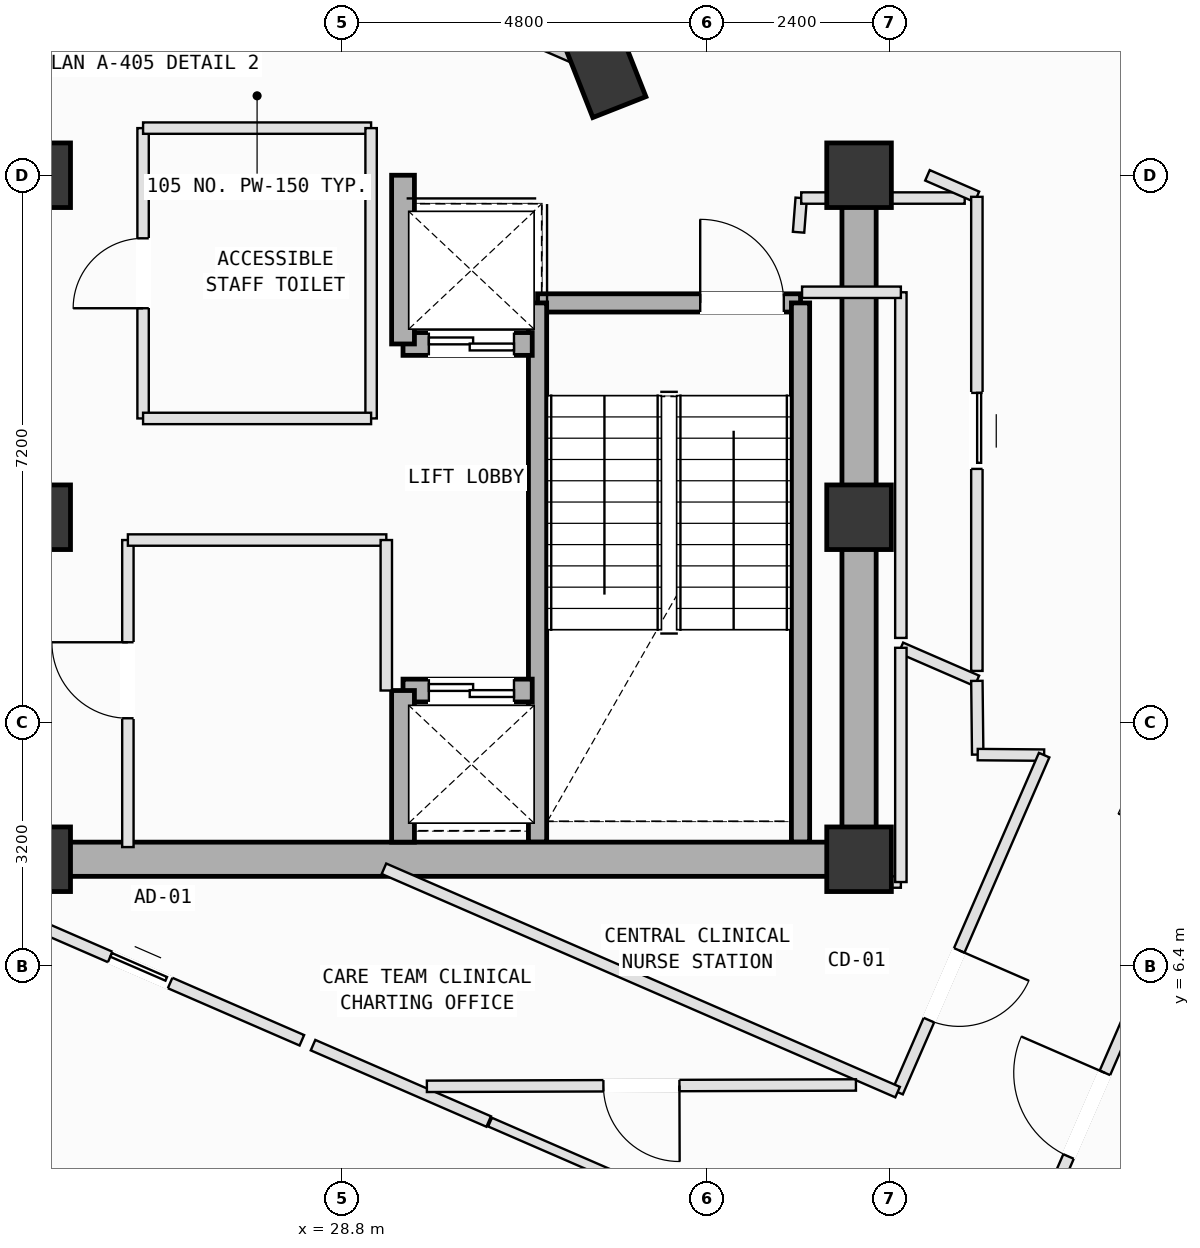
"""IFC4 building model, lengths in metres.
Left out: names, types, materials, properties, quantities, classifications, styles, units other than length and angle.
Written with IfcOpenShell. Run it as: python <this file> out.ifc"""

import sys

from ifc_helpers import new_model, si_unit, direction, frame, frame_2d, origin, origin_2d, place, context, subcontext, project, spatial, rectangle, extrude, element, fill, save


model = new_model("IFC4")
c1 = context("Model", 3, precision=1e-05, world=origin(), true_north=direction((0.0, 1.0)))
c2 = subcontext(c1, "Body", "Model", "MODEL_VIEW")
j1 = project(units=[si_unit("LENGTHUNIT", "METRE"), si_unit("PLANEANGLEUNIT", "RADIAN")], contexts=[c1])
p1 = place(None, origin())
s1 = spatial("IfcSite", under=j1, at=p1, CompositionType="ELEMENT")
p2 = place(p1, origin())
s2 = spatial("IfcBuilding", under=s1, at=p2, CompositionType="ELEMENT")
p3 = place(p2, frame((0.0, 0.0, 324.6)))
s3 = spatial("IfcBuildingStorey", under=s2, at=p3, CompositionType="ELEMENT", Elevation=324.6)
for number, where, z_axis, x_axis in (
    (1, (24.8, 7.8, 0.0), (0.0, 0.0, 1.0), (1.0, 0.0, 0.0)),
    (2, (24.8, 12.3, 0.0), (0.0, 0.0, 1.0), (1.0, 0.0, 0.0)),
    (3, (24.8, 16.8, 0.0), (0.0, 0.0, 1.0), (1.0, 0.0, 0.0)),
    (4, (35.6, 7.8, 0.0), (0.0, 0.0, 1.0), (1.0, 0.0, 0.0)),
    (5, (35.6, 12.3, 0.0), (0.0, 0.0, 1.0), (1.0, 0.0, 0.0)),
    (6, (35.6, 16.8, 0.0), (0.0, 0.0, 1.0), (1.0, 0.0, 0.0)),
):
    element("IfcColumn", number, at=place(p3, frame(where, z_axis=z_axis, x_axis=x_axis)), inside=s3, PredefinedType="COLUMN", context=c2, shape_type="SweptSolid", body=[
        extrude(rectangle(XDim=0.85, YDim=0.85, at=origin_2d()), origin(), (0.0, 0.0, 1.0), 4.0),
    ])
p4 = place(p3, frame((32.226, 18.255, 0.002), z_axis=(0.0, 0.0, 1.0), x_axis=(-0.366501226724, 0.930417567982, 0.0)))
e7 = element("IfcColumn", 7, at=p4, inside=s3, PredefinedType="COLUMN", context=c2, shape_type="SweptSolid", body=[
    extrude(rectangle(XDim=1.2, YDim=0.75, at=origin_2d()), origin(), (0.0, 0.0, 1.0), 3.996),
])
p5 = place(p3, frame((25.484, 21.187, 0.0), z_axis=(0.0, 0.0, 1.0), x_axis=(0.917060568388, -0.398747932794, 0.0)))
e8 = element("IfcWall", 8, at=p5, inside=s3, PredefinedType="SOLIDWALL", context=c2, shape_type="SweptSolid", body=[
    extrude(rectangle(XDim=6.955, YDim=0.28, at=frame_2d((3.478, 0.0))), origin(), (0.0, 0.0, 1.0), 2.765),
])
p6 = place(p3, frame((31.37, 15.12, 0.0), z_axis=(0.0, 0.0, 1.0), x_axis=(1.0, 0.0, 0.0)))
e9 = element("IfcWall", 9, at=p6, inside=s3, PredefinedType="SOLIDWALL", context=c2, shape_type="SweptSolid", body=[
    extrude(rectangle(XDim=3.46, YDim=0.24, at=frame_2d((1.73, 0.0))), origin(), (0.0, 0.0, 1.0), 3.78),
])
p7 = place(p6, frame((2.14, 0.0, 0.0)))
e10 = element("IfcOpeningElement", 10, at=p7, cuts=e9, PredefinedType="OPENING", context=c2, shape_type="SweptSolid", body=[
    extrude(rectangle(XDim=1.1, YDim=2.15, at=frame_2d((0.55, 1.075))), frame((0.0, 0.13, 0.0), z_axis=(0.0, -1.0, 0.0), x_axis=(1.0, 0.0, 0.0)), (0.0, 0.0, 1.0), 0.26),
])
for number, where, z_axis, x_axis in (
    (11, (34.83, 15.12, 0.0), (0.0, 0.0, 1.0), (0.0, -1.0, 0.0)),
    (12, (31.37, 8.025, 0.0), (0.0, 0.0, 1.0), (0.0, 1.0, 0.0)),
):
    element("IfcWall", number, at=place(p3, frame(where, z_axis=z_axis, x_axis=x_axis)), inside=s3, PredefinedType="SOLIDWALL", context=c2, shape_type="SweptSolid", body=[
        extrude(rectangle(XDim=7.095, YDim=0.24, at=frame_2d((3.548, 0.0))), origin(), (0.0, 0.0, 1.0), 3.78),
    ])
p8 = place(p3, frame((24.8, 7.8, 0.0), z_axis=(0.0, 0.0, 1.0), x_axis=(1.0, 0.0, 0.0)))
e13 = element("IfcWall", 13, at=p8, inside=s3, PredefinedType="SHEAR", context=c2, shape_type="SweptSolid", body=[
    extrude(rectangle(XDim=10.8, YDim=0.45, at=frame_2d((5.4, 0.0))), origin(), (0.0, 0.0, 1.0), 3.78),
])
p9 = place(p3, frame((35.6, 7.8, 0.0), z_axis=(0.0, 0.0, 1.0), x_axis=(0.0, 1.0, 0.0)))
e14 = element("IfcWall", 14, at=p9, inside=s3, PredefinedType="SHEAR", context=c2, shape_type="SweptSolid", body=[
    extrude(rectangle(XDim=9.0, YDim=0.45, at=frame_2d((4.5, 0.0))), origin(), (0.0, 0.0, 1.0), 3.78),
])
p10 = place(p3, frame((29.6, 10.02, 0.0), z_axis=(0.0, 0.0, 1.0), x_axis=(1.0, 0.0, 0.0)))
e15 = element("IfcWall", 15, at=p10, inside=s3, PredefinedType="SOLIDWALL", context=c2, shape_type="SweptSolid", body=[
    extrude(rectangle(XDim=1.7, YDim=0.3, at=frame_2d((0.85, 0.0))), origin(), (0.0, 0.0, 1.0), 3.78),
])
p11 = place(p10, frame((0.34, 0.0, 0.0)))
e16 = element("IfcOpeningElement", 16, at=p11, cuts=e15, PredefinedType="OPENING", context=c2, shape_type="SweptSolid", body=[
    extrude(rectangle(XDim=1.12, YDim=2.15, at=frame_2d((0.56, 1.075))), frame((0.0, 0.16, 0.0), z_axis=(0.0, -1.0, 0.0), x_axis=(1.0, 0.0, 0.0)), (0.0, 0.0, 1.0), 0.32),
])
p12 = place(p3, frame((29.6, 8.025, 0.0), z_axis=(0.0, 0.0, 1.0), x_axis=(0.0, 1.0, 0.0)))
e17 = element("IfcWall", 17, at=p12, inside=s3, PredefinedType="SOLIDWALL", context=c2, shape_type="SweptSolid", body=[
    extrude(rectangle(XDim=1.995, YDim=0.3, at=frame_2d((0.998, 0.0))), origin(), (0.0, 0.0, 1.0), 3.78),
])
p13 = place(p3, frame((29.6, 14.58, 0.0), z_axis=(0.0, 0.0, 1.0), x_axis=(1.0, 0.0, 0.0)))
e18 = element("IfcWall", 18, at=p13, inside=s3, PredefinedType="SOLIDWALL", context=c2, shape_type="SweptSolid", body=[
    extrude(rectangle(XDim=1.7, YDim=0.3, at=frame_2d((0.85, 0.0))), origin(), (0.0, 0.0, 1.0), 3.78),
])
p14 = place(p13, frame((0.34, 0.0, 0.0)))
e19 = element("IfcOpeningElement", 19, at=p14, cuts=e18, PredefinedType="OPENING", context=c2, shape_type="SweptSolid", body=[
    extrude(rectangle(XDim=1.12, YDim=2.15, at=frame_2d((0.56, 1.075))), frame((0.0, 0.16, 0.0), z_axis=(0.0, -1.0, 0.0), x_axis=(1.0, 0.0, 0.0)), (0.0, 0.0, 1.0), 0.32),
])
p15 = place(p3, frame((29.6, 14.58, 0.0), z_axis=(0.0, 0.0, 1.0), x_axis=(0.0, 1.0, 0.0)))
e20 = element("IfcWall", 20, at=p15, inside=s3, PredefinedType="SOLIDWALL", context=c2, shape_type="SweptSolid", body=[
    extrude(rectangle(XDim=2.22, YDim=0.3, at=frame_2d((1.11, 0.0))), origin(), (0.0, 0.0, 1.0), 3.78),
])
p16 = place(p3, frame((25.98, 7.96, 0.0), z_axis=(0.0, 0.0, 1.0), x_axis=(0.0, 1.0, 0.0)))
e21 = element("IfcWall", 21, at=p16, inside=s3, PredefinedType="PARTITIONING", context=c2, shape_type="SweptSolid", body=[
    extrude(rectangle(XDim=4.04, YDim=0.15, at=frame_2d((2.02, 0.0))), origin(), (0.0, 0.0, 1.0), 3.78),
])
p17 = place(p16, frame((1.695, 0.0, 0.0)))
e22 = element("IfcOpeningElement", 22, at=p17, cuts=e21, PredefinedType="OPENING", context=c2, shape_type="SweptSolid", body=[
    extrude(rectangle(XDim=1.0, YDim=2.12, at=frame_2d((0.5, 1.06))), frame((0.0, 0.085, 0.0), z_axis=(0.0, -1.0, 0.0), x_axis=(1.0, 0.0, 0.0)), (0.0, 0.0, 1.0), 0.17),
])
p18 = place(p3, frame((25.98, 12.0, 0.0), z_axis=(0.0, 0.0, 1.0), x_axis=(1.0, 0.0, 0.0)))
e23 = element("IfcWall", 23, at=p18, inside=s3, PredefinedType="PARTITIONING", context=c2, shape_type="SweptSolid", body=[
    extrude(rectangle(XDim=3.4, YDim=0.15, at=frame_2d((1.7, 0.0))), origin(), (0.0, 0.0, 1.0), 3.78),
])
p19 = place(p3, frame((29.38, 12.0, 0.0), z_axis=(0.0, 0.0, 1.0), x_axis=(0.0, -1.0, 0.0)))
e24 = element("IfcWall", 24, at=p19, inside=s3, PredefinedType="PARTITIONING", context=c2, shape_type="SweptSolid", body=[
    extrude(rectangle(XDim=1.98, YDim=0.15, at=frame_2d((0.99, 0.0))), origin(), (0.0, 0.0, 1.0), 3.78),
])
p20 = place(p3, frame((26.18, 13.6, 0.0), z_axis=(0.0, 0.0, 1.0), x_axis=(0.0, 1.0, 0.0)))
e25 = element("IfcWall", 25, at=p20, inside=s3, PredefinedType="PARTITIONING", context=c2, shape_type="SweptSolid", body=[
    extrude(rectangle(XDim=3.82, YDim=0.15, at=frame_2d((1.91, 0.0))), origin(), (0.0, 0.0, 1.0), 3.78),
])
p21 = place(p20, frame((1.45, 0.0, 0.0)))
e26 = element("IfcOpeningElement", 26, at=p21, cuts=e25, PredefinedType="OPENING", context=c2, shape_type="SweptSolid", body=[
    extrude(rectangle(XDim=0.92, YDim=2.1, at=frame_2d((0.46, 1.05))), frame((0.0, 0.085, 0.0), z_axis=(0.0, -1.0, 0.0), x_axis=(1.0, 0.0, 0.0)), (0.0, 0.0, 1.0), 0.17),
])
p22 = place(p3, frame((26.18, 17.42, 0.0), z_axis=(0.0, 0.0, 1.0), x_axis=(1.0, 0.0, 0.0)))
e27 = element("IfcWall", 27, at=p22, inside=s3, PredefinedType="PARTITIONING", context=c2, shape_type="SweptSolid", body=[
    extrude(rectangle(XDim=3.0, YDim=0.15, at=frame_2d((1.5, 0.0))), origin(), (0.0, 0.0, 1.0), 3.78),
])
p23 = place(p3, frame((29.18, 17.42, 0.0), z_axis=(0.0, 0.0, 1.0), x_axis=(0.0, -1.0, 0.0)))
e28 = element("IfcWall", 28, at=p23, inside=s3, PredefinedType="PARTITIONING", context=c2, shape_type="SweptSolid", body=[
    extrude(rectangle(XDim=3.82, YDim=0.15, at=frame_2d((1.91, 0.0))), origin(), (0.0, 0.0, 1.0), 3.78),
])
p24 = place(p3, frame((29.18, 13.6, 0.0), z_axis=(0.0, 0.0, 1.0), x_axis=(-1.0, 0.0, 0.0)))
e29 = element("IfcWall", 29, at=p24, inside=s3, PredefinedType="PARTITIONING", context=c2, shape_type="SweptSolid", body=[
    extrude(rectangle(XDim=3.0, YDim=0.15, at=frame_2d((1.5, 0.0))), origin(), (0.0, 0.0, 1.0), 3.78),
])
p25 = place(p3, frame((37.75, 2.495, 0.0), z_axis=(0.0, 0.0, 1.0), x_axis=(0.398827178626, 0.917026107365, 0.0)))
e30 = element("IfcWall", 30, at=p25, inside=s3, PredefinedType="PARTITIONING", context=c2, shape_type="SweptSolid", body=[
    extrude(rectangle(XDim=4.24, YDim=0.15, at=frame_2d((2.12, 0.0))), origin(), (0.0, 0.0, 1.0), 3.78),
])
p26 = place(p25, frame((1.52, 0.0, 0.0)))
e31 = element("IfcOpeningElement", 31, at=p26, cuts=e30, PredefinedType="OPENING", context=c2, shape_type="SweptSolid", body=[
    extrude(rectangle(XDim=1.2, YDim=2.15, at=frame_2d((0.6, 1.075))), frame((0.0, 0.085, 0.0), z_axis=(0.0, -1.0, 0.0), x_axis=(1.0, 0.0, 0.0)), (0.0, 0.0, 1.0), 0.17),
])
p27 = place(p3, frame((28.416, 5.354, 0.0), z_axis=(0.0, 0.0, 1.0), x_axis=(0.917057734147, -0.398754451062, 0.0)))
e32 = element("IfcWall", 32, at=p27, inside=s3, PredefinedType="PARTITIONING", context=c2, shape_type="SweptSolid", body=[
    extrude(rectangle(XDim=2.52, YDim=0.15, at=frame_2d((1.26, 0.0))), origin(), (0.0, 0.0, 1.0), 3.78),
])
p28 = place(p3, frame((30.745, 4.341, 0.0), z_axis=(0.0, 0.0, 1.0), x_axis=(0.917094083809, -0.398670843481, 0.0)))
e33 = element("IfcWall", 33, at=p28, inside=s3, PredefinedType="PARTITIONING", context=c2, shape_type="SweptSolid", body=[
    extrude(rectangle(XDim=2.1, YDim=0.125, at=frame_2d((1.05, 0.0))), origin(), (0.0, 0.0, 1.0), 3.78),
])
p29 = place(p3, frame((24.014, 7.268, 0.0), z_axis=(0.0, 0.0, 1.0), x_axis=(0.91706671013, -0.398733807411, 0.0)))
e34 = element("IfcWall", 34, at=p29, inside=s3, PredefinedType="PARTITIONING", context=c2, shape_type="SweptSolid", body=[
    extrude(rectangle(XDim=4.64, YDim=0.15, at=frame_2d((2.32, 0.0))), origin(), (0.0, 0.0, 1.0), 3.78),
])
p30 = place(p29, frame((1.89, 0.0, 0.0)))
e35 = element("IfcOpeningElement", 35, at=p30, cuts=e34, PredefinedType="OPENING", context=c2, shape_type="SweptSolid", body=[
    extrude(rectangle(XDim=0.86, YDim=2.06, at=frame_2d((0.43, 1.03))), frame((0.0, 0.085, 0.0), z_axis=(0.0, -1.0, 0.0), x_axis=(1.0, 0.0, 0.0)), (0.0, 0.0, 1.0), 0.17),
])
p31 = place(p3, frame((36.15, 10.582, 0.0), z_axis=(0.0, 0.0, 1.0), x_axis=(0.916977493273, -0.398938938724, 0.0)))
e36 = element("IfcWall", 36, at=p31, inside=s3, PredefinedType="PARTITIONING", context=c2, shape_type="SweptSolid", body=[
    extrude(rectangle(XDim=1.091, YDim=0.15, at=frame_2d((0.545, 0.0))), origin(), (0.0, 0.0, 1.0), 3.78),
])
p32 = place(p3, frame((37.15, 10.147, 0.0), z_axis=(0.0, 0.0, 1.0), x_axis=(0.011325727104, -0.999935861896, 0.0)))
e37 = element("IfcWall", 37, at=p32, inside=s3, PredefinedType="PARTITIONING", context=c2, shape_type="SweptSolid", body=[
    extrude(rectangle(XDim=0.97, YDim=0.15, at=frame_2d((0.485, 0.0))), origin(), (0.0, 0.0, 1.0), 3.78),
])
p33 = place(p3, frame((37.161, 9.177, 0.0), z_axis=(0.0, 0.0, 1.0), x_axis=(0.999967192089, -0.008100292897, 0.0)))
e38 = element("IfcWall", 38, at=p33, inside=s3, PredefinedType="PARTITIONING", context=c2, shape_type="SweptSolid", body=[
    extrude(rectangle(XDim=0.874, YDim=0.15, at=frame_2d((0.437, 0.0))), origin(), (0.0, 0.0, 1.0), 3.78),
])
p34 = place(p3, frame((38.035, 9.17, 0.0), z_axis=(0.0, 0.0, 1.0), x_axis=(-0.398764886009, -0.917053196759, 0.0)))
e39 = element("IfcWall", 39, at=p34, inside=s3, PredefinedType="PARTITIONING", context=c2, shape_type="SweptSolid", body=[
    extrude(rectangle(XDim=4.835, YDim=0.15, at=frame_2d((2.417, 0.0))), origin(), (0.0, 0.0, 1.0), 3.78),
])
p35 = place(p34, frame((2.802, 0.0, 0.0)))
e40 = element("IfcOpeningElement", 40, at=p35, cuts=e39, PredefinedType="OPENING", context=c2, shape_type="SweptSolid", body=[
    extrude(rectangle(XDim=1.0, YDim=2.12, at=frame_2d((0.5, 1.06))), frame((0.0, 0.085, 0.0), z_axis=(0.0, -1.0, 0.0), x_axis=(1.0, 0.0, 0.0)), (0.0, 0.0, 1.0), 0.17),
])
p36 = place(p3, frame((36.107, 4.736, 0.0), z_axis=(0.0, 0.0, 1.0), x_axis=(-0.917031075712, 0.398815754676, 0.0)))
e41 = element("IfcWall", 41, at=p36, inside=s3, PredefinedType="PARTITIONING", context=c2, shape_type="SweptSolid", body=[
    extrude(rectangle(XDim=7.369, YDim=0.15, at=frame_2d((3.685, 0.0))), origin(), (0.0, 0.0, 1.0), 3.78),
])
p37 = place(p3, frame((35.6, 7.5, 0.0), z_axis=(0.0, 0.0, 1.0), x_axis=(1.0, 0.0, 0.0)))
e42 = element("IfcWall", 42, at=p37, inside=s3, PredefinedType="PARTITIONING", context=c2, shape_type="SweptSolid", body=[
    extrude(rectangle(XDim=0.55, YDim=0.15, at=frame_2d((0.275, 0.0))), origin(), (0.0, 0.0, 1.0), 2.765),
])
p38 = place(p3, frame((36.15, 7.5, 0.0), z_axis=(0.0, 0.0, 1.0), x_axis=(0.0, 1.0, 0.0)))
e43 = element("IfcWall", 43, at=p38, inside=s3, PredefinedType="PARTITIONING", context=c2, shape_type="SweptSolid", body=[
    extrude(rectangle(XDim=3.082, YDim=0.15, at=frame_2d((1.541, 0.0))), origin(), (0.0, 0.0, 1.0), 3.78),
])
p39 = place(p3, frame((34.804, 16.05, 0.0), z_axis=(0.0, 0.0, 1.0), x_axis=(0.077896068279, 0.996961484987, 0.0)))
e44 = element("IfcWall", 44, at=p39, inside=s3, PredefinedType="PARTITIONING", context=c2, shape_type="SweptSolid", body=[
    extrude(rectangle(XDim=0.451, YDim=0.15, at=frame_2d((0.226, 0.0))), origin(), (0.0, 0.0, 1.0), 3.78),
])
p40 = place(p3, frame((34.839, 16.5, 0.0), z_axis=(0.0, 0.0, 1.0), x_axis=(1.0, 0.0, 0.0)))
e45 = element("IfcWall", 45, at=p40, inside=s3, PredefinedType="PARTITIONING", context=c2, shape_type="SweptSolid", body=[
    extrude(rectangle(XDim=2.151, YDim=0.15, at=frame_2d((1.075, 0.0))), origin(), (0.0, 0.0, 1.0), 2.765),
])
p41 = place(p3, frame((36.5, 16.799, 0.0), z_axis=(0.0, 0.0, 1.0), x_axis=(0.916867333156, -0.399192050762, 0.0)))
e46 = element("IfcWall", 46, at=p41, inside=s3, PredefinedType="PARTITIONING", context=c2, shape_type="SweptSolid", body=[
    extrude(rectangle(XDim=0.709, YDim=0.15, at=frame_2d((0.354, 0.0))), origin(), (0.0, 0.0, 1.0), 3.78),
])
p42 = place(p3, frame((37.15, 16.516, 0.0), z_axis=(0.0, 0.0, 1.0), x_axis=(0.0, -1.0, 0.0)))
e47 = element("IfcWall", 47, at=p42, inside=s3, PredefinedType="PARTITIONING", context=c2, shape_type="SweptSolid", body=[
    extrude(rectangle(XDim=6.238, YDim=0.15, at=frame_2d((3.119, 0.0))), origin(), (0.0, 0.0, 1.0), 3.78),
])
p43 = place(p42, frame((2.58, 0.0, 0.0)))
e48 = element("IfcOpeningElement", 48, at=p43, cuts=e47, PredefinedType="OPENING", context=c2, shape_type="SweptSolid", body=[
    extrude(rectangle(XDim=1.0, YDim=2.12, at=frame_2d((0.5, 1.06))), frame((0.0, 0.085, 0.0), z_axis=(0.0, -1.0, 0.0), x_axis=(1.0, 0.0, 0.0)), (0.0, 0.0, 1.0), 0.17),
])
p44 = place(p3, frame((36.15, 10.712, 0.0), z_axis=(0.0, 0.0, 1.0), x_axis=(0.0, 1.0, 0.0)))
e49 = element("IfcWall", 49, at=p44, inside=s3, PredefinedType="PARTITIONING", context=c2, shape_type="SweptSolid", body=[
    extrude(rectangle(XDim=4.548, YDim=0.15, at=frame_2d((2.274, 0.0))), origin(), (0.0, 0.0, 1.0), 3.78),
])
p45 = place(p3, frame((36.15, 15.26, 0.0), z_axis=(0.0, 0.0, 1.0), x_axis=(-1.0, 0.0, 0.0)))
e50 = element("IfcWall", 50, at=p45, inside=s3, PredefinedType="PARTITIONING", context=c2, shape_type="SweptSolid", body=[
    extrude(rectangle(XDim=1.3, YDim=0.15, at=frame_2d((0.65, 0.0))), origin(), (0.0, 0.0, 1.0), 3.78),
])
p46 = place(p3, frame((35.559, 4.83, 0.0), z_axis=(0.0, 0.0, 1.0), x_axis=(-0.999994878711, -0.003200398799, 0.0)))
e51 = element("IfcWall", 51, at=p46, inside=s3, PredefinedType="PARTITIONING", context=c2, shape_type="SweptSolid", body=[
    extrude(rectangle(XDim=5.645, YDim=0.15, at=frame_2d((2.823, 0.0))), origin(), (0.0, 0.0, 1.0), 3.78),
])
p47 = place(p46, frame((2.323, 0.0, 0.0)))
e52 = element("IfcOpeningElement", 52, at=p47, cuts=e51, PredefinedType="OPENING", context=c2, shape_type="SweptSolid", body=[
    extrude(rectangle(XDim=1.0, YDim=2.12, at=frame_2d((0.5, 1.06))), frame((0.0, 0.085, 0.0), z_axis=(0.0, -1.0, 0.0), x_axis=(1.0, 0.0, 0.0)), (0.0, 0.0, 1.0), 0.17),
])
p48 = place(p7, origin())
e53 = element("IfcDoor", 53, at=p48, inside=s3, OperationType="SINGLE_SWING_LEFT", PredefinedType="DOOR", context=c2, shape_type="SweptSolid", body=[
    extrude(rectangle(XDim=1.1, YDim=2.15, at=frame_2d((0.55, 1.075))), frame((0.0, 0.025, 0.0), z_axis=(0.0, -1.0, 0.0), x_axis=(1.0, 0.0, 0.0)), (0.0, 0.0, 1.0), 0.05),
])
fill(e10, e53)
p49 = place(p11, origin())
e54 = element("IfcDoor", 54, at=p49, inside=s3, OperationType="DOUBLE_DOOR_SLIDING", PredefinedType="DOOR", context=c2, shape_type="SweptSolid", body=[
    extrude(rectangle(XDim=1.12, YDim=2.15, at=frame_2d((0.56, 1.075))), frame((0.0, 0.025, 0.0), z_axis=(0.0, -1.0, 0.0), x_axis=(1.0, 0.0, 0.0)), (0.0, 0.0, 1.0), 0.05),
])
fill(e16, e54)
p50 = place(p14, origin())
e55 = element("IfcDoor", 55, at=p50, inside=s3, OperationType="DOUBLE_DOOR_SLIDING", PredefinedType="DOOR", context=c2, shape_type="SweptSolid", body=[
    extrude(rectangle(XDim=1.12, YDim=2.15, at=frame_2d((0.56, 1.075))), frame((0.0, 0.025, 0.0), z_axis=(0.0, -1.0, 0.0), x_axis=(1.0, 0.0, 0.0)), (0.0, 0.0, 1.0), 0.05),
])
fill(e19, e55)
p51 = place(p17, origin())
e56 = element("IfcDoor", 56, at=p51, inside=s3, OperationType="SINGLE_SWING_RIGHT", PredefinedType="DOOR", context=c2, shape_type="SweptSolid", body=[
    extrude(rectangle(XDim=1.0, YDim=2.12, at=frame_2d((0.5, 1.06))), frame((0.0, 0.025, 0.0), z_axis=(0.0, -1.0, 0.0), x_axis=(1.0, 0.0, 0.0)), (0.0, 0.0, 1.0), 0.05),
])
fill(e22, e56)
p52 = place(p21, origin())
e57 = element("IfcDoor", 57, at=p52, inside=s3, OperationType="SINGLE_SWING_LEFT", PredefinedType="DOOR", context=c2, shape_type="SweptSolid", body=[
    extrude(rectangle(XDim=0.92, YDim=2.1, at=frame_2d((0.46, 1.05))), frame((0.0, 0.025, 0.0), z_axis=(0.0, -1.0, 0.0), x_axis=(1.0, 0.0, 0.0)), (0.0, 0.0, 1.0), 0.05),
])
fill(e26, e57)
p53 = place(p26, origin())
e58 = element("IfcDoor", 58, at=p53, inside=s3, OperationType="SINGLE_SWING_RIGHT", PredefinedType="DOOR", context=c2, shape_type="SweptSolid", body=[
    extrude(rectangle(XDim=1.2, YDim=2.15, at=frame_2d((0.6, 1.075))), frame((0.0, 0.025, 0.0), z_axis=(0.0, -1.0, 0.0), x_axis=(1.0, 0.0, 0.0)), (0.0, 0.0, 1.0), 0.05),
])
fill(e31, e58)
p54 = place(p35, origin())
e59 = element("IfcDoor", 59, at=p54, inside=s3, OperationType="SINGLE_SWING_LEFT", PredefinedType="DOOR", context=c2, shape_type="SweptSolid", body=[
    extrude(rectangle(XDim=1.0, YDim=2.12, at=frame_2d((0.5, 1.06))), frame((0.0, 0.025, 0.0), z_axis=(0.0, -1.0, 0.0), x_axis=(1.0, 0.0, 0.0)), (0.0, 0.0, 1.0), 0.05),
])
fill(e40, e59)
p55 = place(p43, origin())
e60 = element("IfcDoor", 60, at=p55, inside=s3, OperationType="SLIDING_TO_LEFT", PredefinedType="DOOR", context=c2, shape_type="SweptSolid", body=[
    extrude(rectangle(XDim=1.0, YDim=2.12, at=frame_2d((0.5, 1.06))), frame((0.0, 0.025, 0.0), z_axis=(0.0, -1.0, 0.0), x_axis=(1.0, 0.0, 0.0)), (0.0, 0.0, 1.0), 0.05),
])
fill(e48, e60)
p56 = place(p47, origin())
e61 = element("IfcDoor", 61, at=p56, inside=s3, OperationType="SINGLE_SWING_LEFT", PredefinedType="DOOR", context=c2, shape_type="SweptSolid", body=[
    extrude(rectangle(XDim=1.0, YDim=2.12, at=frame_2d((0.5, 1.06))), frame((0.0, 0.025, 0.0), z_axis=(0.0, -1.0, 0.0), x_axis=(1.0, 0.0, 0.0)), (0.0, 0.0, 1.0), 0.05),
])
fill(e52, e61)
p57 = place(p30, origin())
e62 = element("IfcDoor", 62, at=p57, inside=s3, OperationType="SLIDING_TO_LEFT", PredefinedType="DOOR", context=c2, shape_type="SweptSolid", body=[
    extrude(rectangle(XDim=0.86, YDim=2.06, at=frame_2d((0.43, 1.03))), frame((0.0, 0.025, 0.0), z_axis=(0.0, -1.0, 0.0), x_axis=(1.0, 0.0, 0.0)), (0.0, 0.0, 1.0), 0.05),
])
fill(e35, e62)
save(model, sys.argv[1])
